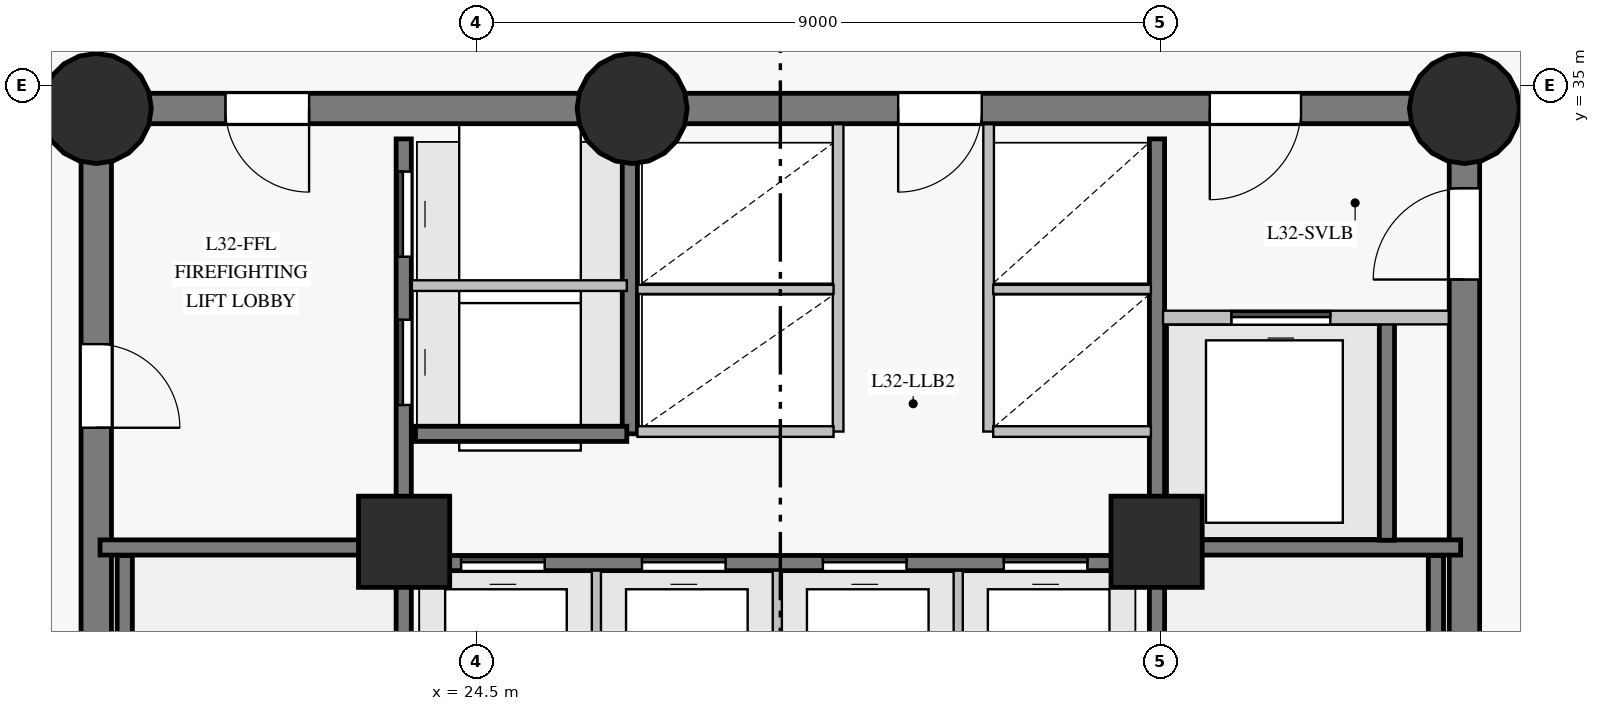
"""IFC4 building model, lengths in metres.
Left out: names, types, materials, properties, quantities, classifications, styles, units other than length and angle.
Written with IfcOpenShell. Run it as: python <this file> out.ifc"""

import sys

from ifc_helpers import new_model, si_unit, direction, frame, frame_2d, origin, origin_with_axes, origin_2d, place, context, subcontext, project, spatial, rectangle, circle, extrude, source, transform, mapped, element, fill, save


model = new_model("IFC4")
c1 = context("Model", 3, precision=1e-05, world=origin(), true_north=direction((0.0, 1.0)))
c2 = subcontext(c1, "Body", "Model", "MODEL_VIEW")
j1 = project(units=[si_unit("LENGTHUNIT", "METRE"), si_unit("PLANEANGLEUNIT", "RADIAN")], contexts=[c1])
p1 = place(None, origin())
s1 = spatial("IfcSite", under=j1, at=p1, CompositionType="ELEMENT")
p2 = place(p1, origin())
s2 = spatial("IfcBuilding", under=s1, at=p2, CompositionType="ELEMENT")
p3 = place(p2, frame((0.0, 0.0, 117.55)))
s3 = spatial("IfcBuildingStorey", under=s2, at=p3, CompositionType="ELEMENT", Elevation=117.55)
p4 = place(p3, frame((37.5, 18.3, 0.0), z_axis=(0.0, 0.0, 1.0), x_axis=(0.0, 1.0, 0.0)))
e1 = element("IfcWall", 1, at=p4, inside=s3, PredefinedType="SHEAR", context=c2, shape_type="SweptSolid", body=[
    extrude(rectangle(XDim=16.4, YDim=0.4, at=frame_2d((8.2, 0.0))), origin(), (0.0, 0.0, 1.0), 2.825),
])
p5 = place(p4, frame((14.15, 0.0, 0.0)))
e2 = element("IfcOpeningElement", 2, at=p5, cuts=e1, PredefinedType="OPENING", context=c2, shape_type="SweptSolid", body=[
    extrude(rectangle(XDim=1.2, YDim=2.15, at=frame_2d((0.6, 1.075))), frame((0.0, 0.21, 0.0), z_axis=(0.0, -1.0, 0.0), x_axis=(1.0, 0.0, 0.0)), (0.0, 0.0, 1.0), 0.42),
])
p6 = place(p3, frame((37.5, 34.7, 0.0), z_axis=(0.0, 0.0, 1.0), x_axis=(-1.0, 0.0, 0.0)))
e3 = element("IfcWall", 3, at=p6, inside=s3, PredefinedType="SHEAR", context=c2, shape_type="SweptSolid", body=[
    extrude(rectangle(XDim=10.95, YDim=0.4, at=frame_2d((5.475, 0.0))), origin(), (0.0, 0.0, 1.0), 2.825),
])
p7 = place(p6, frame((2.15, 0.0, 0.0)))
e4 = element("IfcOpeningElement", 4, at=p7, cuts=e3, PredefinedType="OPENING", context=c2, shape_type="SweptSolid", body=[
    extrude(rectangle(XDim=1.2, YDim=2.15, at=frame_2d((0.6, 1.075))), frame((0.0, 0.21, 0.0), z_axis=(0.0, -1.0, 0.0), x_axis=(1.0, 0.0, 0.0)), (0.0, 0.0, 1.0), 0.42),
])
p8 = place(p6, frame((6.35, 0.0, 0.0)))
e5 = element("IfcOpeningElement", 5, at=p8, cuts=e3, PredefinedType="OPENING", context=c2, shape_type="SweptSolid", body=[
    extrude(rectangle(XDim=1.1, YDim=2.15, at=frame_2d((0.55, 1.075))), frame((0.0, 0.21, 0.0), z_axis=(0.0, -1.0, 0.0), x_axis=(1.0, 0.0, 0.0)), (0.0, 0.0, 1.0), 0.42),
])
p9 = place(p3, frame((26.55, 34.7, 0.0), z_axis=(0.0, 0.0, 1.0), x_axis=(-1.0, 0.0, 0.0)))
e6 = element("IfcWall", 6, at=p9, inside=s3, PredefinedType="SHEAR", context=c2, shape_type="SweptSolid", body=[
    extrude(rectangle(XDim=7.05, YDim=0.4, at=frame_2d((3.525, 0.0))), origin(), (0.0, 0.0, 1.0), 2.825),
])
p10 = place(p9, frame((4.25, 0.0, 0.0)))
e7 = element("IfcOpeningElement", 7, at=p10, cuts=e6, PredefinedType="OPENING", context=c2, shape_type="SweptSolid", body=[
    extrude(rectangle(XDim=1.1, YDim=2.15, at=frame_2d((0.55, 1.075))), frame((0.0, 0.21, 0.0), z_axis=(0.0, -1.0, 0.0), x_axis=(1.0, 0.0, 0.0)), (0.0, 0.0, 1.0), 0.42),
])
p11 = place(p3, frame((19.5, 34.7, 0.0), z_axis=(0.0, 0.0, 1.0), x_axis=(0.0, -1.0, 0.0)))
e8 = element("IfcWall", 8, at=p11, inside=s3, PredefinedType="SHEAR", context=c2, shape_type="SweptSolid", body=[
    extrude(rectangle(XDim=16.4, YDim=0.4, at=frame_2d((8.2, 0.0))), origin(), (0.0, 0.0, 1.0), 2.825),
])
p12 = place(p11, frame((3.1, 0.0, 0.0)))
e9 = element("IfcOpeningElement", 9, at=p12, cuts=e8, PredefinedType="OPENING", context=c2, shape_type="SweptSolid", body=[
    extrude(rectangle(XDim=1.1, YDim=2.15, at=frame_2d((0.55, 1.075))), frame((0.0, 0.21, 0.0), z_axis=(0.0, -1.0, 0.0), x_axis=(1.0, 0.0, 0.0)), (0.0, 0.0, 1.0), 0.42),
])
m1 = source(origin_with_axes(), c2, "Body", "SweptSolid", [
    extrude(circle(Radius=0.725, at=origin_2d()), origin(), (0.0, 0.0, 1.0), 3.05),
])
for number, where, z_axis, x_axis in (
    (10, (19.5, 34.7, 0.0), (0.0, 0.0, 1.0), (1.0, 0.0, 0.0)),
    (11, (26.55, 34.7, 0.0), (0.0, 0.0, 1.0), (1.0, 0.0, 0.0)),
    (12, (37.5, 34.7, 0.0), (0.0, 0.0, 1.0), (1.0, 0.0, 0.0)),
):
    element("IfcColumn", number, at=place(p3, frame(where, z_axis=z_axis, x_axis=x_axis)), inside=s3, PredefinedType="COLUMN", context=c2, shape_type="MappedRepresentation", body=[
        mapped(m1, transform((0.0, 0.0, 0.0), scale=1.0)),
    ])
m2 = source(origin_with_axes(), c2, "Body", "SweptSolid", [
    extrude(rectangle(XDim=1.2, YDim=1.2, at=origin_2d()), origin(), (0.0, 0.0, 1.0), 3.05),
])
for number, where, z_axis, x_axis in (
    (13, (23.55, 29.0, 0.0), (0.0, 0.0, 1.0), (1.0, 0.0, 0.0)),
    (14, (33.45, 29.0, 0.0), (0.0, 0.0, 1.0), (1.0, 0.0, 0.0)),
):
    element("IfcColumn", number, at=place(p3, frame(where, z_axis=z_axis, x_axis=x_axis)), inside=s3, PredefinedType="COLUMN", context=c2, shape_type="MappedRepresentation", body=[
        mapped(m2, transform((0.0, 0.0, 0.0), scale=1.0)),
    ])
p13 = place(p3, frame((23.545, 18.7, 0.0), z_axis=(0.0, 0.0, 1.0), x_axis=(0.0, 1.0, 0.0)))
e15 = element("IfcWall", 15, at=p13, inside=s3, PredefinedType="SHEAR", context=c2, shape_type="SweptSolid", body=[
    extrude(rectangle(XDim=15.6, YDim=0.2, at=frame_2d((7.8, 0.0))), origin(), (0.0, 0.0, 1.0), 2.825),
])
p14 = place(p13, frame((2.75, 0.0, 0.0)))
e16 = element("IfcOpeningElement", 16, at=p14, cuts=e15, PredefinedType="OPENING", context=c2, shape_type="SweptSolid", body=[
    extrude(rectangle(XDim=1.15, YDim=2.15, at=frame_2d((0.575, 1.075))), frame((0.0, 0.11, 0.0), z_axis=(0.0, -1.0, 0.0), x_axis=(1.0, 0.0, 0.0)), (0.0, 0.0, 1.0), 0.22),
])
p15 = place(p13, frame((0.14, 0.0, 0.0)))
e17 = element("IfcOpeningElement", 17, at=p15, cuts=e15, PredefinedType="OPENING", context=c2, shape_type="SweptSolid", body=[
    extrude(rectangle(XDim=0.88, YDim=2.1, at=frame_2d((0.44, 1.05))), frame((0.0, 0.11, 0.0), z_axis=(0.0, -1.0, 0.0), x_axis=(1.0, 0.0, 0.0)), (0.0, 0.0, 1.0), 0.22),
])
p16 = place(p13, frame((1.36, 0.0, 0.0)))
e18 = element("IfcOpeningElement", 18, at=p16, cuts=e15, PredefinedType="OPENING", context=c2, shape_type="SweptSolid", body=[
    extrude(rectangle(XDim=0.88, YDim=2.1, at=frame_2d((0.44, 1.05))), frame((0.0, 0.11, 0.0), z_axis=(0.0, -1.0, 0.0), x_axis=(1.0, 0.0, 0.0)), (0.0, 0.0, 1.0), 0.22),
])
p17 = place(p13, frame((12.1, 0.0, 0.0)))
e19 = element("IfcOpeningElement", 19, at=p17, cuts=e15, PredefinedType="OPENING", context=c2, shape_type="SweptSolid", body=[
    extrude(rectangle(XDim=1.12, YDim=2.15, at=frame_2d((0.56, 1.075))), frame((0.0, 0.11, 0.0), z_axis=(0.0, -1.0, 0.0), x_axis=(1.0, 0.0, 0.0)), (0.0, 0.0, 1.0), 0.22),
])
p18 = place(p13, frame((14.05, 0.0, 0.0)))
e20 = element("IfcOpeningElement", 20, at=p18, cuts=e15, PredefinedType="OPENING", context=c2, shape_type="SweptSolid", body=[
    extrude(rectangle(XDim=1.12, YDim=2.15, at=frame_2d((0.56, 1.075))), frame((0.0, 0.11, 0.0), z_axis=(0.0, -1.0, 0.0), x_axis=(1.0, 0.0, 0.0)), (0.0, 0.0, 1.0), 0.22),
])
p19 = place(p3, frame((33.455, 18.7, 0.0), z_axis=(0.0, 0.0, 1.0), x_axis=(0.0, 1.0, 0.0)))
e21 = element("IfcWall", 21, at=p19, inside=s3, PredefinedType="SHEAR", context=c2, shape_type="SweptSolid", body=[
    extrude(rectangle(XDim=15.6, YDim=0.2, at=frame_2d((7.8, 0.0))), origin(), (0.0, 0.0, 1.0), 2.825),
])
p20 = place(p19, frame((2.75, 0.0, 0.0)))
e22 = element("IfcOpeningElement", 22, at=p20, cuts=e21, PredefinedType="OPENING", context=c2, shape_type="SweptSolid", body=[
    extrude(rectangle(XDim=1.15, YDim=2.15, at=frame_2d((0.575, 1.075))), frame((0.0, 0.11, 0.0), z_axis=(0.0, -1.0, 0.0), x_axis=(1.0, 0.0, 0.0)), (0.0, 0.0, 1.0), 0.22),
])
p21 = place(p19, frame((0.55, 0.0, 0.0)))
e23 = element("IfcOpeningElement", 23, at=p21, cuts=e21, PredefinedType="OPENING", context=c2, shape_type="SweptSolid", body=[
    extrude(rectangle(XDim=0.94, YDim=2.1, at=frame_2d((0.47, 1.05))), frame((0.0, 0.11, 0.0), z_axis=(0.0, -1.0, 0.0), x_axis=(1.0, 0.0, 0.0)), (0.0, 0.0, 1.0), 0.22),
])
p22 = place(p3, frame((23.7, 28.72, 0.0), z_axis=(0.0, 0.0, 1.0), x_axis=(1.0, 0.0, 0.0)))
e24 = element("IfcWall", 24, at=p22, inside=s3, PredefinedType="SHEAR", context=c2, shape_type="SweptSolid", body=[
    extrude(rectangle(XDim=9.6, YDim=0.2, at=frame_2d((4.8, 0.0))), origin(), (0.0, 0.0, 1.0), 2.825),
])
p23 = place(p22, frame((0.6, 0.0, 0.0)))
e25 = element("IfcOpeningElement", 25, at=p23, cuts=e24, PredefinedType="OPENING", context=c2, shape_type="SweptSolid", body=[
    extrude(rectangle(XDim=1.1, YDim=2.15, at=frame_2d((0.55, 1.075))), frame((0.0, 0.11, 0.0), z_axis=(0.0, -1.0, 0.0), x_axis=(1.0, 0.0, 0.0)), (0.0, 0.0, 1.0), 0.22),
])
p24 = place(p22, frame((2.98, 0.0, 0.0)))
e26 = element("IfcOpeningElement", 26, at=p24, cuts=e24, PredefinedType="OPENING", context=c2, shape_type="SweptSolid", body=[
    extrude(rectangle(XDim=1.1, YDim=2.15, at=frame_2d((0.55, 1.075))), frame((0.0, 0.11, 0.0), z_axis=(0.0, -1.0, 0.0), x_axis=(1.0, 0.0, 0.0)), (0.0, 0.0, 1.0), 0.22),
])
p25 = place(p22, frame((5.36, 0.0, 0.0)))
e27 = element("IfcOpeningElement", 27, at=p25, cuts=e24, PredefinedType="OPENING", context=c2, shape_type="SweptSolid", body=[
    extrude(rectangle(XDim=1.1, YDim=2.15, at=frame_2d((0.55, 1.075))), frame((0.0, 0.11, 0.0), z_axis=(0.0, -1.0, 0.0), x_axis=(1.0, 0.0, 0.0)), (0.0, 0.0, 1.0), 0.22),
])
p26 = place(p22, frame((7.74, 0.0, 0.0)))
e28 = element("IfcOpeningElement", 28, at=p26, cuts=e24, PredefinedType="OPENING", context=c2, shape_type="SweptSolid", body=[
    extrude(rectangle(XDim=1.1, YDim=2.15, at=frame_2d((0.55, 1.075))), frame((0.0, 0.11, 0.0), z_axis=(0.0, -1.0, 0.0), x_axis=(1.0, 0.0, 0.0)), (0.0, 0.0, 1.0), 0.22),
])
for number, where, z_axis, x_axis in (
    (29, (19.875, 21.32, 0.0), (0.0, 0.0, 1.0), (0.0, 1.0, 0.0)),
    (30, (37.125, 21.32, 0.0), (0.0, 0.0, 1.0), (0.0, 1.0, 0.0)),
):
    element("IfcWall", number, at=place(p3, frame(where, z_axis=z_axis, x_axis=x_axis)), inside=s3, PredefinedType="SHEAR", context=c2, shape_type="SweptSolid", body=[
        extrude(rectangle(XDim=7.5, YDim=0.2, at=frame_2d((3.75, 0.0))), origin(), (0.0, 0.0, 1.0), 2.825),
    ])
for number, where, z_axis, x_axis in (
    (31, (33.455, 28.925, 0.0), (0.0, 0.0, 1.0), (1.0, 0.0, 0.0)),
    (32, (19.55, 28.925, 0.0), (0.0, 0.0, 1.0), (1.0, 0.0, 0.0)),
):
    element("IfcWall", number, at=place(p3, frame(where, z_axis=z_axis, x_axis=x_axis)), inside=s3, PredefinedType="SHEAR", context=c2, shape_type="SweptSolid", body=[
        extrude(rectangle(XDim=3.995, YDim=0.2, at=frame_2d((1.998, 0.0))), origin(), (0.0, 0.0, 1.0), 2.825),
    ])
p27 = place(p3, frame((26.52, 30.42, 0.0), z_axis=(0.0, 0.0, 1.0), x_axis=(0.0, 1.0, 0.0)))
e33 = element("IfcWall", 33, at=p27, inside=s3, PredefinedType="SHEAR", context=c2, shape_type="SweptSolid", body=[
    extrude(rectangle(XDim=3.86, YDim=0.2, at=frame_2d((1.93, 0.0))), origin(), (0.0, 0.0, 1.0), 2.825),
])
p28 = place(p3, frame((36.48, 29.02, 0.0), z_axis=(0.0, 0.0, 1.0), x_axis=(0.0, 1.0, 0.0)))
e34 = element("IfcWall", 34, at=p28, inside=s3, PredefinedType="SHEAR", context=c2, shape_type="SweptSolid", body=[
    extrude(rectangle(XDim=2.86, YDim=0.2, at=frame_2d((1.43, 0.0))), origin(), (0.0, 0.0, 1.0), 2.825),
])
p29 = place(p3, frame((23.7, 30.42, 0.0), z_axis=(0.0, 0.0, 1.0), x_axis=(1.0, 0.0, 0.0)))
e35 = element("IfcWall", 35, at=p29, inside=s3, PredefinedType="SHEAR", context=c2, shape_type="SweptSolid", body=[
    extrude(rectangle(XDim=2.78, YDim=0.2, at=frame_2d((1.39, 0.0))), origin(), (0.0, 0.0, 1.0), 2.825),
])
for number, where, z_axis, x_axis in (
    (36, (29.26, 30.45, 0.0), (0.0, 0.0, 1.0), (0.0, 1.0, 0.0)),
    (37, (31.24, 30.45, 0.0), (0.0, 0.0, 1.0), (0.0, 1.0, 0.0)),
):
    element("IfcWall", number, at=place(p3, frame(where, z_axis=z_axis, x_axis=x_axis)), inside=s3, PredefinedType="PARTITIONING", context=c2, shape_type="SweptSolid", body=[
        extrude(rectangle(XDim=4.043, YDim=0.14, at=frame_2d((2.021, 0.0))), origin(), (0.0, 0.0, 1.0), 2.825),
    ])
p30 = place(p3, frame((33.535, 31.95, 0.0), z_axis=(0.0, 0.0, 1.0), x_axis=(1.0, 0.0, 0.0)))
e38 = element("IfcWall", 38, at=p30, inside=s3, PredefinedType="PARTITIONING", context=c2, shape_type="SweptSolid", body=[
    extrude(rectangle(XDim=3.759, YDim=0.18, at=frame_2d((1.879, 0.0))), origin(), (0.0, 0.0, 1.0), 2.825),
])
p31 = place(p30, frame((0.9, 0.0, 0.0)))
e39 = element("IfcOpeningElement", 39, at=p31, cuts=e38, PredefinedType="OPENING", context=c2, shape_type="SweptSolid", body=[
    extrude(rectangle(XDim=1.3, YDim=2.2, at=frame_2d((0.65, 1.1))), frame((0.0, 0.1, 0.0), z_axis=(0.0, -1.0, 0.0), x_axis=(1.0, 0.0, 0.0)), (0.0, 0.0, 1.0), 0.2),
])
p32 = place(p3, frame((23.652, 32.37, 0.0), z_axis=(0.0, 0.0, 1.0), x_axis=(1.0, 0.0, 0.0)))
e40 = element("IfcWall", 40, at=p32, inside=s3, PredefinedType="PARTITIONING", context=c2, shape_type="SweptSolid", body=[
    extrude(rectangle(XDim=2.828, YDim=0.14, at=frame_2d((1.414, 0.0))), origin(), (0.0, 0.0, 1.0), 2.825),
])
for number, where, z_axis, x_axis in (
    (41, (26.08, 26.02, 0.0), (0.0, 0.0, 1.0), (0.0, 1.0, 0.0)),
    (42, (28.46, 26.02, 0.0), (0.0, 0.0, 1.0), (0.0, 1.0, 0.0)),
    (43, (30.84, 26.02, 0.0), (0.0, 0.0, 1.0), (0.0, 1.0, 0.0)),
):
    element("IfcWall", number, at=place(p3, frame(where, z_axis=z_axis, x_axis=x_axis)), inside=s3, PredefinedType="PARTITIONING", context=c2, shape_type="SweptSolid", body=[
        extrude(rectangle(XDim=2.6, YDim=0.12, at=frame_2d((1.3, 0.0))), origin(), (0.0, 0.0, 1.0), 2.825),
    ])
p33 = place(p3, frame((26.62, 30.45, 0.0), z_axis=(0.0, 0.0, 1.0), x_axis=(1.0, 0.0, 0.0)))
e44 = element("IfcWall", 44, at=p33, inside=s3, PredefinedType="PARTITIONING", context=c2, shape_type="SweptSolid", body=[
    extrude(rectangle(XDim=2.58, YDim=0.14, at=frame_2d((1.29, 0.0))), origin(), (0.0, 0.0, 1.0), 2.825),
])
p34 = place(p3, frame((26.62, 32.32, 0.0), z_axis=(0.0, 0.0, 1.0), x_axis=(1.0, 0.0, 0.0)))
e45 = element("IfcWall", 45, at=p34, inside=s3, PredefinedType="PARTITIONING", context=c2, shape_type="SweptSolid", body=[
    extrude(rectangle(XDim=2.58, YDim=0.12, at=frame_2d((1.29, 0.0))), origin(), (0.0, 0.0, 1.0), 2.825),
])
p35 = place(p3, frame((31.3, 30.45, 0.0), z_axis=(0.0, 0.0, 1.0), x_axis=(1.0, 0.0, 0.0)))
e46 = element("IfcWall", 46, at=p35, inside=s3, PredefinedType="PARTITIONING", context=c2, shape_type="SweptSolid", body=[
    extrude(rectangle(XDim=2.075, YDim=0.14, at=frame_2d((1.038, 0.0))), origin(), (0.0, 0.0, 1.0), 2.825),
])
p36 = place(p3, frame((31.3, 32.32, 0.0), z_axis=(0.0, 0.0, 1.0), x_axis=(1.0, 0.0, 0.0)))
e47 = element("IfcWall", 47, at=p36, inside=s3, PredefinedType="PARTITIONING", context=c2, shape_type="SweptSolid", body=[
    extrude(rectangle(XDim=2.075, YDim=0.12, at=frame_2d((1.038, 0.0))), origin(), (0.0, 0.0, 1.0), 2.825),
])
m3 = source(origin_with_axes(), c2, "Body", "SweptSolid", [
    extrude(rectangle(XDim=1.1, YDim=2.15, at=frame_2d((0.55, 1.075))), frame((0.0, 0.025, 0.0), z_axis=(0.0, -1.0, 0.0), x_axis=(1.0, 0.0, 0.0)), (0.0, 0.0, 1.0), 0.05),
])
p37 = place(p10, origin())
e48 = element("IfcDoor", 48, at=p37, inside=s3, OperationType="SINGLE_SWING_LEFT", PredefinedType="DOOR", context=c2, shape_type="MappedRepresentation", body=[
    mapped(m3, transform((0.0, 0.0, 0.0), scale=1.0)),
])
fill(e7, e48)
p38 = place(p12, origin())
e49 = element("IfcDoor", 49, at=p38, inside=s3, OperationType="SINGLE_SWING_RIGHT", PredefinedType="DOOR", context=c2, shape_type="MappedRepresentation", body=[
    mapped(m3, transform((0.0, 0.0, 0.0), scale=1.0)),
])
fill(e9, e49)
m4 = source(origin_with_axes(), c2, "Body", "SweptSolid", [
    extrude(rectangle(XDim=1.2, YDim=2.15, at=frame_2d((0.6, 1.075))), frame((0.0, 0.025, 0.0), z_axis=(0.0, -1.0, 0.0), x_axis=(1.0, 0.0, 0.0)), (0.0, 0.0, 1.0), 0.05),
])
p39 = place(p5, origin())
e50 = element("IfcDoor", 50, at=p39, inside=s3, OperationType="SINGLE_SWING_LEFT", PredefinedType="DOOR", context=c2, shape_type="MappedRepresentation", body=[
    mapped(m4, transform((0.0, 0.0, 0.0), scale=1.0)),
])
fill(e2, e50)
p40 = place(p7, origin())
e51 = element("IfcDoor", 51, at=p40, inside=s3, OperationType="SINGLE_SWING_RIGHT", PredefinedType="DOOR", context=c2, shape_type="MappedRepresentation", body=[
    mapped(m4, transform((0.0, 0.0, 0.0), scale=1.0)),
])
fill(e4, e51)
m5 = source(origin_with_axes(), c2, "Body", "SweptSolid", [
    extrude(rectangle(XDim=1.3, YDim=2.2, at=frame_2d((0.65, 1.1))), frame((0.0, 0.025, 0.0), z_axis=(0.0, -1.0, 0.0), x_axis=(1.0, 0.0, 0.0)), (0.0, 0.0, 1.0), 0.05),
])
p41 = place(p31, origin())
e52 = element("IfcDoor", 52, at=p41, inside=s3, OperationType="SLIDING_TO_LEFT", PredefinedType="DOOR", context=c2, shape_type="MappedRepresentation", body=[
    mapped(m5, transform((0.0, 0.0, 0.0), scale=1.0)),
])
fill(e39, e52)
p42 = place(p23, origin())
e53 = element("IfcDoor", 53, at=p42, inside=s3, OperationType="SLIDING_TO_LEFT", PredefinedType="DOOR", context=c2, shape_type="MappedRepresentation", body=[
    mapped(m3, transform((0.0, 0.0, 0.0), scale=1.0)),
])
fill(e25, e53)
p43 = place(p24, origin())
e54 = element("IfcDoor", 54, at=p43, inside=s3, OperationType="SLIDING_TO_RIGHT", PredefinedType="DOOR", context=c2, shape_type="MappedRepresentation", body=[
    mapped(m3, transform((0.0, 0.0, 0.0), scale=1.0)),
])
fill(e26, e54)
p44 = place(p25, origin())
e55 = element("IfcDoor", 55, at=p44, inside=s3, OperationType="SLIDING_TO_LEFT", PredefinedType="DOOR", context=c2, shape_type="MappedRepresentation", body=[
    mapped(m3, transform((0.0, 0.0, 0.0), scale=1.0)),
])
fill(e27, e55)
p45 = place(p26, origin())
e56 = element("IfcDoor", 56, at=p45, inside=s3, OperationType="SLIDING_TO_RIGHT", PredefinedType="DOOR", context=c2, shape_type="MappedRepresentation", body=[
    mapped(m3, transform((0.0, 0.0, 0.0), scale=1.0)),
])
fill(e28, e56)
p46 = place(p8, origin())
e57 = element("IfcDoor", 57, at=p46, inside=s3, OperationType="SINGLE_SWING_RIGHT", PredefinedType="DOOR", context=c2, shape_type="MappedRepresentation", body=[
    mapped(m3, transform((0.0, 0.0, 0.0), scale=1.0)),
])
fill(e5, e57)
m6 = source(origin_with_axes(), c2, "Body", "SweptSolid", [
    extrude(rectangle(XDim=1.12, YDim=2.15, at=frame_2d((0.56, 1.075))), frame((0.0, 0.025, 0.0), z_axis=(0.0, -1.0, 0.0), x_axis=(1.0, 0.0, 0.0)), (0.0, 0.0, 1.0), 0.05),
])
p47 = place(p17, origin())
e58 = element("IfcDoor", 58, at=p47, inside=s3, OperationType="SLIDING_TO_LEFT", PredefinedType="DOOR", context=c2, shape_type="MappedRepresentation", body=[
    mapped(m6, transform((0.0, 0.0, 0.0), scale=1.0)),
])
fill(e19, e58)
p48 = place(p18, origin())
e59 = element("IfcDoor", 59, at=p48, inside=s3, OperationType="SLIDING_TO_RIGHT", PredefinedType="DOOR", context=c2, shape_type="MappedRepresentation", body=[
    mapped(m6, transform((0.0, 0.0, 0.0), scale=1.0)),
])
fill(e20, e59)
save(model, sys.argv[1])
